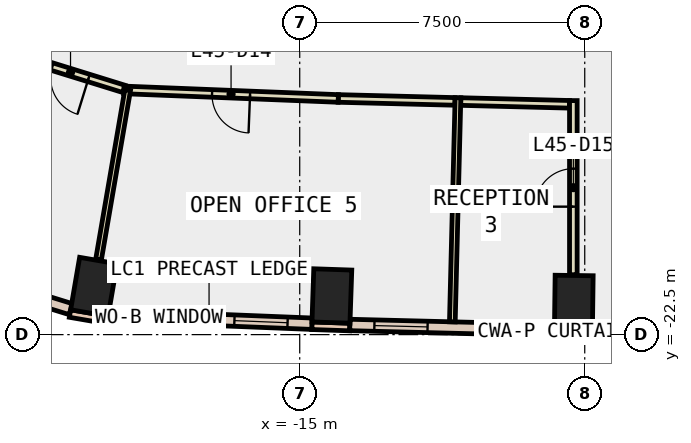
"""IFC4 building model, lengths in metres.
Left out: names, types, materials, properties, quantities, classifications, styles, units other than length and angle.
Written with IfcOpenShell. Run it as: python <this file> out.ifc"""

import sys

from ifc_helpers import new_model, si_unit, direction, frame, frame_2d, origin, origin_2d, place, context, subcontext, project, spatial, rectangle, extrude, element, fill, save


model = new_model("IFC4")
c1 = context("Model", 3, precision=1e-05, world=origin(), true_north=direction((0.0, 1.0)))
c2 = subcontext(c1, "Body", "Model", "MODEL_VIEW")
j1 = project(units=[si_unit("LENGTHUNIT", "METRE"), si_unit("PLANEANGLEUNIT", "RADIAN")], contexts=[c1])
p1 = place(None, origin())
s1 = spatial("IfcSite", under=j1, at=p1, CompositionType="ELEMENT")
p2 = place(p1, origin())
s2 = spatial("IfcBuilding", under=s1, at=p2, CompositionType="ELEMENT")
p3 = place(p2, frame((0.0, 0.0, 202.4)))
s3 = spatial("IfcBuildingStorey", under=s2, at=p3, CompositionType="ELEMENT", Elevation=202.4)
for number, where, z_axis, x_axis in (
    (1, (-20.417, -21.241, -0.4), (0.0, 0.0, 1.0), (-0.986, 0.169, 0.0)),
    (2, (-14.154, -21.484, -0.4), (0.0, 0.0, 1.0), (-0.999, 0.034, 0.0)),
    (3, (-7.788, -21.644, -0.4), (0.0, 0.0, 1.0), (-1.0, 0.013, 0.0)),
):
    element("IfcColumn", number, at=place(p3, frame(where, z_axis=z_axis, x_axis=x_axis)), inside=s3, PredefinedType="COLUMN", context=c2, shape_type="SweptSolid", body=[
        extrude(rectangle(XDim=1.0, YDim=1.4, at=origin_2d()), origin(), (0.0, 0.0, 1.0), 4.2),
    ])
p4 = place(p3, frame((-21.045, -21.945, 0.0), z_axis=(0.0, 0.0, 1.0), x_axis=(0.985631544579, -0.168909615862, 0.0)))
e4 = element("IfcWall", 4, at=p4, inside=s3, PredefinedType="STANDARD", context=c2, shape_type="SweptSolid", body=[
    extrude(rectangle(XDim=1.0, YDim=0.2, at=frame_2d((0.5, 0.0))), origin(), (0.0, 0.0, 1.0), 3.8),
])
p5 = place(p3, frame((-14.681, -22.266, 0.0), z_axis=(0.0, 0.0, 1.0), x_axis=(0.999423561854, -0.033949138587, 0.0)))
e5 = element("IfcWall", 5, at=p5, inside=s3, PredefinedType="STANDARD", context=c2, shape_type="SweptSolid", body=[
    extrude(rectangle(XDim=1.0, YDim=0.2, at=frame_2d((0.5, 0.0))), origin(), (0.0, 0.0, 1.0), 3.8),
])
p6 = place(p3, frame((-8.299, -22.437, 0.0), z_axis=(0.0, 0.0, 1.0), x_axis=(0.999903186316, -0.013914668364, 0.0)))
e6 = element("IfcWall", 6, at=p6, inside=s3, PredefinedType="STANDARD", context=c2, shape_type="SweptSolid", body=[
    extrude(rectangle(XDim=1.0, YDim=0.2, at=frame_2d((0.5, 0.0))), origin(), (0.0, 0.0, 1.0), 3.8),
])
p7 = place(p3, frame((-20.04, -21.999, 0.0), z_axis=(0.0, 0.0, 1.0), x_axis=(0.999205241612, -0.039860822062, 0.0)))
e7 = element("IfcWall", 7, at=p7, inside=s3, PredefinedType="STANDARD", context=c2, shape_type="SweptSolid", body=[
    extrude(rectangle(XDim=5.365, YDim=0.3, at=frame_2d((2.683, 0.0))), origin(), (0.0, 0.0, 1.0), 3.8),
])
p8 = place(p7, frame((0.641, 0.0, 0.9)))
e8 = element("IfcOpeningElement", 8, at=p8, cuts=e7, PredefinedType="OPENING", context=c2, shape_type="SweptSolid", body=[
    extrude(rectangle(XDim=1.4, YDim=2.6, at=frame_2d((0.7, 1.3))), frame((0.0, 0.16, 0.0), z_axis=(0.0, -1.0, 0.0), x_axis=(1.0, 0.0, 0.0)), (0.0, 0.0, 1.0), 0.32),
])
p9 = place(p7, frame((3.324, 0.0, 0.9)))
e9 = element("IfcOpeningElement", 9, at=p9, cuts=e7, PredefinedType="OPENING", context=c2, shape_type="SweptSolid", body=[
    extrude(rectangle(XDim=1.4, YDim=2.6, at=frame_2d((0.7, 1.3))), frame((0.0, 0.16, 0.0), z_axis=(0.0, -1.0, 0.0), x_axis=(1.0, 0.0, 0.0)), (0.0, 0.0, 1.0), 0.32),
])
p10 = place(p3, frame((-13.681, -22.246, 0.0), z_axis=(0.0, 0.0, 1.0), x_axis=(0.999685717988, -0.025069209235, 0.0)))
e10 = element("IfcWall", 10, at=p10, inside=s3, PredefinedType="STANDARD", context=c2, shape_type="SweptSolid", body=[
    extrude(rectangle(XDim=5.385, YDim=0.3, at=frame_2d((2.693, 0.0))), origin(), (0.0, 0.0, 1.0), 3.8),
])
p11 = place(p10, frame((0.646, 0.0, 0.9)))
e11 = element("IfcOpeningElement", 11, at=p11, cuts=e10, PredefinedType="OPENING", context=c2, shape_type="SweptSolid", body=[
    extrude(rectangle(XDim=1.4, YDim=2.6, at=frame_2d((0.7, 1.3))), frame((0.0, 0.16, 0.0), z_axis=(0.0, -1.0, 0.0), x_axis=(1.0, 0.0, 0.0)), (0.0, 0.0, 1.0), 0.32),
])
p12 = place(p10, frame((3.339, 0.0, 0.9)))
e12 = element("IfcOpeningElement", 12, at=p12, cuts=e10, PredefinedType="OPENING", context=c2, shape_type="SweptSolid", body=[
    extrude(rectangle(XDim=1.4, YDim=2.6, at=frame_2d((0.7, 1.3))), frame((0.0, 0.16, 0.0), z_axis=(0.0, -1.0, 0.0), x_axis=(1.0, 0.0, 0.0)), (0.0, 0.0, 1.0), 0.32),
])
p13 = place(p3, frame((-24.999, -20.599, 0.0), z_axis=(0.0, 0.0, 1.0), x_axis=(0.955247215067, -0.295808651171, 0.0)))
e13 = element("IfcWall", 13, at=p13, inside=s3, PredefinedType="STANDARD", context=c2, shape_type="SweptSolid", body=[
    extrude(rectangle(XDim=4.161, YDim=0.3, at=frame_2d((2.081, 0.0))), origin(), (0.0, 0.0, 1.0), 3.8),
])
p14 = place(p13, frame((1.381, 0.0, 0.9)))
e14 = element("IfcOpeningElement", 14, at=p14, cuts=e13, PredefinedType="OPENING", context=c2, shape_type="SweptSolid", body=[
    extrude(rectangle(XDim=1.4, YDim=2.6, at=frame_2d((0.7, 1.3))), frame((0.0, 0.16, 0.0), z_axis=(0.0, -1.0, 0.0), x_axis=(1.0, 0.0, 0.0)), (0.0, 0.0, 1.0), 0.32),
])
p15 = place(p3, frame((-19.623, -16.035, 0.0), z_axis=(0.0, 0.0, 1.0), x_axis=(-0.955234616163, 0.295849333419, 0.0)))
e15 = element("IfcWall", 15, at=p15, inside=s3, PredefinedType="PARTITIONING", context=c2, shape_type="SweptSolid", body=[
    extrude(rectangle(XDim=2.947, YDim=0.2, at=frame_2d((1.473, 0.0))), origin(), (0.0, 0.0, 1.0), 3.8),
])
p16 = place(p15, frame((0.974, 0.0, 0.0)))
e16 = element("IfcOpeningElement", 16, at=p16, cuts=e15, PredefinedType="OPENING", context=c2, shape_type="SweptSolid", body=[
    extrude(rectangle(XDim=1.0, YDim=2.1, at=frame_2d((0.5, 1.05))), frame((0.0, 0.11, 0.0), z_axis=(0.0, -1.0, 0.0), x_axis=(1.0, 0.0, 0.0)), (0.0, 0.0, 1.0), 0.22),
])
p17 = place(p3, frame((-10.913, -16.364, 0.0), z_axis=(0.0, 0.0, 1.0), x_axis=(-0.999676990694, 0.02541484365, 0.0)))
e17 = element("IfcWall", 17, at=p17, inside=s3, PredefinedType="PARTITIONING", context=c2, shape_type="SweptSolid", body=[
    extrude(rectangle(XDim=3.074, YDim=0.2, at=frame_2d((1.537, 0.0))), origin(), (0.0, 0.0, 1.0), 3.8),
])
p18 = place(p3, frame((-13.986, -16.286, 0.0), z_axis=(0.0, 0.0, 1.0), x_axis=(-0.999206475857, 0.039829870775, 0.0)))
e18 = element("IfcWall", 18, at=p18, inside=s3, PredefinedType="PARTITIONING", context=c2, shape_type="SweptSolid", body=[
    extrude(rectangle(XDim=5.645, YDim=0.2, at=frame_2d((2.823, 0.0))), origin(), (0.0, 0.0, 1.0), 3.8),
])
p19 = place(p18, frame((2.323, 0.0, 0.0)))
e19 = element("IfcOpeningElement", 19, at=p19, cuts=e18, PredefinedType="OPENING", context=c2, shape_type="SweptSolid", body=[
    extrude(rectangle(XDim=1.0, YDim=2.1, at=frame_2d((0.5, 1.05))), frame((0.0, 0.11, 0.0), z_axis=(0.0, -1.0, 0.0), x_axis=(1.0, 0.0, 0.0)), (0.0, 0.0, 1.0), 0.22),
])
p20 = place(p3, frame((-7.9, -16.44, 0.0), z_axis=(0.0, 0.0, 1.0), x_axis=(-0.999675117104, 0.025488433531, 0.0)))
e20 = element("IfcWall", 20, at=p20, inside=s3, PredefinedType="PARTITIONING", context=c2, shape_type="SweptSolid", body=[
    extrude(rectangle(XDim=2.864, YDim=0.2, at=frame_2d((1.432, 0.0))), origin(), (0.0, 0.0, 1.0), 3.8),
])
p21 = place(p3, frame((-7.8, -20.924, 0.0), z_axis=(0.0, 0.0, 1.0), x_axis=(0.0, 1.0, 0.0)))
e21 = element("IfcWall", 21, at=p21, inside=s3, PredefinedType="PARTITIONING", context=c2, shape_type="SweptSolid", body=[
    extrude(rectangle(XDim=4.582, YDim=0.2, at=frame_2d((2.291, 0.0))), origin(), (0.0, 0.0, 1.0), 3.8),
])
p22 = place(p21, frame((1.791, 0.0, 0.0)))
e22 = element("IfcOpeningElement", 22, at=p22, cuts=e21, PredefinedType="OPENING", context=c2, shape_type="SweptSolid", body=[
    extrude(rectangle(XDim=1.0, YDim=2.1, at=frame_2d((0.5, 1.05))), frame((0.0, 0.11, 0.0), z_axis=(0.0, -1.0, 0.0), x_axis=(1.0, 0.0, 0.0)), (0.0, 0.0, 1.0), 0.22),
])
p23 = place(p3, frame((-19.527, -16.065, 0.0), z_axis=(0.0, 0.0, 1.0), x_axis=(-0.169437821314, -0.985540879268, 0.0)))
e23 = element("IfcWall", 23, at=p23, inside=s3, PredefinedType="PARTITIONING", context=c2, shape_type="SweptSolid", body=[
    extrude(rectangle(XDim=4.531, YDim=0.15, at=frame_2d((2.266, 0.0))), origin(), (0.0, 0.0, 1.0), 3.8),
])
p24 = place(p3, frame((-10.836, -16.266, 0.0), z_axis=(0.0, 0.0, 1.0), x_axis=(-0.025076969416, -0.999685523355, 0.0)))
e24 = element("IfcWall", 24, at=p24, inside=s3, PredefinedType="PARTITIONING", context=c2, shape_type="SweptSolid", body=[
    extrude(rectangle(XDim=5.9, YDim=0.15, at=frame_2d((2.95, 0.0))), origin(), (0.0, 0.0, 1.0), 3.8),
])
p25 = place(p8, origin())
e25 = element("IfcWindow", 25, at=p25, inside=s3, PartitioningType="SINGLE_PANEL", PredefinedType="WINDOW", context=c2, shape_type="SweptSolid", body=[
    extrude(rectangle(XDim=1.4, YDim=2.6, at=frame_2d((0.7, 1.3))), frame((0.0, 0.03, 0.0), z_axis=(0.0, -1.0, 0.0), x_axis=(1.0, 0.0, 0.0)), (0.0, 0.0, 1.0), 0.06),
])
fill(e8, e25)
p26 = place(p9, origin())
e26 = element("IfcWindow", 26, at=p26, inside=s3, PartitioningType="SINGLE_PANEL", PredefinedType="WINDOW", context=c2, shape_type="SweptSolid", body=[
    extrude(rectangle(XDim=1.4, YDim=2.6, at=frame_2d((0.7, 1.3))), frame((0.0, 0.03, 0.0), z_axis=(0.0, -1.0, 0.0), x_axis=(1.0, 0.0, 0.0)), (0.0, 0.0, 1.0), 0.06),
])
fill(e9, e26)
p27 = place(p11, origin())
e27 = element("IfcWindow", 27, at=p27, inside=s3, PartitioningType="SINGLE_PANEL", PredefinedType="WINDOW", context=c2, shape_type="SweptSolid", body=[
    extrude(rectangle(XDim=1.4, YDim=2.6, at=frame_2d((0.7, 1.3))), frame((0.0, 0.03, 0.0), z_axis=(0.0, -1.0, 0.0), x_axis=(1.0, 0.0, 0.0)), (0.0, 0.0, 1.0), 0.06),
])
fill(e11, e27)
p28 = place(p12, origin())
e28 = element("IfcWindow", 28, at=p28, inside=s3, PartitioningType="SINGLE_PANEL", PredefinedType="WINDOW", context=c2, shape_type="SweptSolid", body=[
    extrude(rectangle(XDim=1.4, YDim=2.6, at=frame_2d((0.7, 1.3))), frame((0.0, 0.03, 0.0), z_axis=(0.0, -1.0, 0.0), x_axis=(1.0, 0.0, 0.0)), (0.0, 0.0, 1.0), 0.06),
])
fill(e12, e28)
p29 = place(p16, origin())
e29 = element("IfcDoor", 29, at=p29, inside=s3, OperationType="SINGLE_SWING_LEFT", PredefinedType="DOOR", context=c2, shape_type="SweptSolid", body=[
    extrude(rectangle(XDim=1.0, YDim=2.1, at=frame_2d((0.5, 1.05))), frame((0.0, 0.025, 0.0), z_axis=(0.0, -1.0, 0.0), x_axis=(1.0, 0.0, 0.0)), (0.0, 0.0, 1.0), 0.05),
])
fill(e16, e29)
p30 = place(p19, origin())
e30 = element("IfcDoor", 30, at=p30, inside=s3, OperationType="SINGLE_SWING_LEFT", PredefinedType="DOOR", context=c2, shape_type="SweptSolid", body=[
    extrude(rectangle(XDim=1.0, YDim=2.1, at=frame_2d((0.5, 1.05))), frame((0.0, 0.025, 0.0), z_axis=(0.0, -1.0, 0.0), x_axis=(1.0, 0.0, 0.0)), (0.0, 0.0, 1.0), 0.05),
])
fill(e19, e30)
p31 = place(p22, origin())
e31 = element("IfcDoor", 31, at=p31, inside=s3, OperationType="SINGLE_SWING_LEFT", PredefinedType="DOOR", context=c2, shape_type="SweptSolid", body=[
    extrude(rectangle(XDim=1.0, YDim=2.1, at=frame_2d((0.5, 1.05))), frame((0.0, 0.025, 0.0), z_axis=(0.0, -1.0, 0.0), x_axis=(1.0, 0.0, 0.0)), (0.0, 0.0, 1.0), 0.05),
])
fill(e22, e31)
save(model, sys.argv[1])
